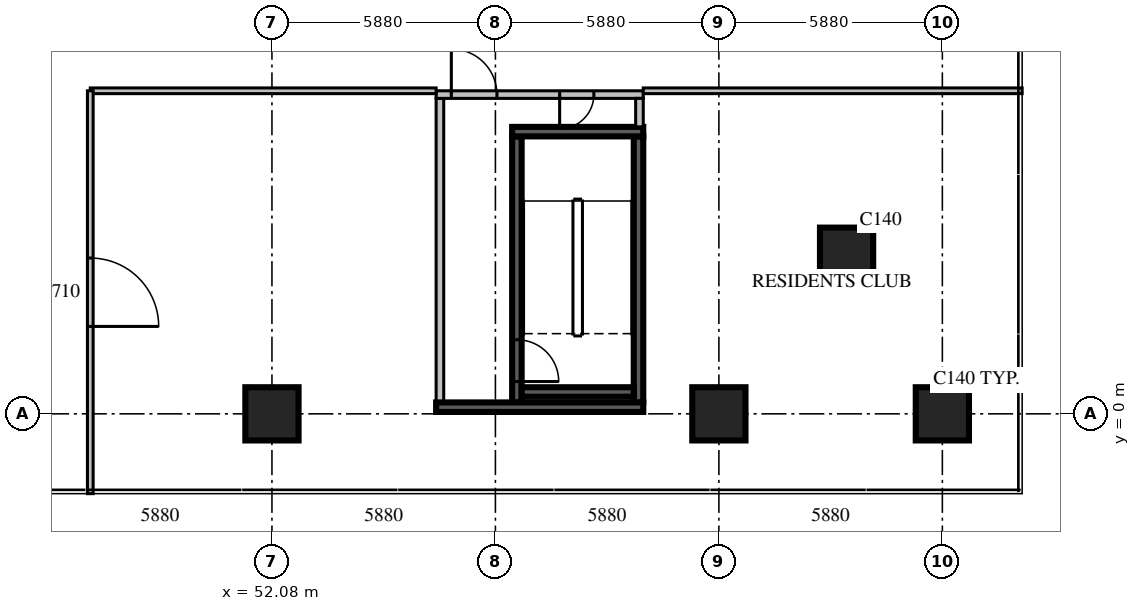
"""IFC4 building model, lengths in metres.
Left out: names, types, materials, properties, quantities, classifications, styles, units other than length and angle.
Written with IfcOpenShell. Run it as: python <this file> out.ifc"""

import sys

from ifc_helpers import new_model, si_unit, direction, frame, frame_2d, origin, origin_2d, place, context, subcontext, project, spatial, rectangle, extrude, source, transform, mapped, element, fill, save


model = new_model("IFC4")
c1 = context("Model", 3, precision=1e-05, world=origin(), true_north=direction((0.0, 1.0)))
c2 = subcontext(c1, "Body", "Model", "MODEL_VIEW")
j1 = project(units=[si_unit("LENGTHUNIT", "METRE"), si_unit("PLANEANGLEUNIT", "RADIAN")], contexts=[c1])
p1 = place(None, origin())
s1 = spatial("IfcSite", under=j1, at=p1, CompositionType="ELEMENT")
p2 = place(p1, origin())
s2 = spatial("IfcBuilding", under=s1, at=p2, CompositionType="ELEMENT")
p3 = place(p2, frame((0.0, 0.0, 23.7)))
s3 = spatial("IfcBuildingStorey", under=s2, at=p3, CompositionType="ELEMENT", Elevation=23.7)
m1 = source(origin(), c2, "Body", "SweptSolid", [
    extrude(rectangle(XDim=1.4, YDim=1.4, at=origin_2d()), origin(), (0.0, 0.0, 1.0), 5.4),
])
for number, where, z_axis, x_axis in (
    (1, (52.08, 0.0, 0.0), (0.0, 0.0, 1.0), (1.0, 0.0, 0.0)),
    (2, (63.84, 0.0, 0.0), (0.0, 0.0, 1.0), (1.0, 0.0, 0.0)),
    (3, (67.2, 4.2, 0.0), (0.0, 0.0, 1.0), (1.0, 0.0, 0.0)),
    (4, (69.72, 0.0, 0.0), (0.0, 0.0, 1.0), (1.0, 0.0, 0.0)),
):
    element("IfcColumn", number, at=place(p3, frame(where, z_axis=z_axis, x_axis=x_axis)), inside=s3, PredefinedType="COLUMN", context=c2, shape_type="MappedRepresentation", body=[
        mapped(m1, transform((0.0, 0.0, 0.0), scale=1.0)),
    ])
m2 = source(origin(), c2, "Body", "SweptSolid", [
    extrude(rectangle(XDim=7.0, YDim=0.25, at=frame_2d((3.5, 0.0))), origin(), (0.0, 0.0, 1.0), 4.8),
])
p4 = place(p3, frame((58.525, 0.3, 0.0), z_axis=(0.0, 0.0, 1.0), x_axis=(0.0, 1.0, 0.0)))
e5 = element("IfcWall", 5, at=p4, inside=s3, PredefinedType="SOLIDWALL", context=c2, shape_type="MappedRepresentation", body=[
    mapped(m2, transform((0.0, 0.0, 0.0), scale=1.0)),
])
m3 = source(origin(), c2, "Body", "SweptSolid", [
    extrude(rectangle(XDim=1.1, YDim=2.1, at=frame_2d((0.55, 1.05))), frame((0.0, 0.135, 0.0), z_axis=(0.0, -1.0, 0.0), x_axis=(1.0, 0.0, 0.0)), (0.0, 0.0, 1.0), 0.27),
])
p5 = place(p4, frame((0.55, 0.0, 0.0)))
e6 = element("IfcOpeningElement", 6, at=p5, cuts=e5, PredefinedType="OPENING", context=c2, shape_type="MappedRepresentation", body=[
    mapped(m3, transform((0.0, 0.0, 0.0), scale=1.0)),
])
p6 = place(p3, frame((61.725, 0.3, 0.0), z_axis=(0.0, 0.0, 1.0), x_axis=(0.0, 1.0, 0.0)))
e7 = element("IfcWall", 7, at=p6, inside=s3, PredefinedType="SOLIDWALL", context=c2, shape_type="MappedRepresentation", body=[
    mapped(m2, transform((0.0, 0.0, 0.0), scale=1.0)),
])
m4 = source(origin(), c2, "Body", "SweptSolid", [
    extrude(rectangle(XDim=3.45, YDim=0.25, at=frame_2d((1.725, 0.0))), origin(), (0.0, 0.0, 1.0), 4.8),
])
p7 = place(p3, frame((58.4, 7.425, 0.0), z_axis=(0.0, 0.0, 1.0), x_axis=(1.0, 0.0, 0.0)))
e8 = element("IfcWall", 8, at=p7, inside=s3, PredefinedType="SOLIDWALL", context=c2, shape_type="MappedRepresentation", body=[
    mapped(m4, transform((0.0, 0.0, 0.0), scale=1.0)),
])
m5 = source(origin(), c2, "Body", "SweptSolid", [
    extrude(rectangle(XDim=2.95, YDim=0.25, at=frame_2d((1.475, 0.0))), origin(), (0.0, 0.0, 1.0), 4.8),
])
p8 = place(p3, frame((58.65, 0.575, 0.0), z_axis=(0.0, 0.0, 1.0), x_axis=(1.0, 0.0, 0.0)))
e9 = element("IfcWall", 9, at=p8, inside=s3, PredefinedType="SOLIDWALL", context=c2, shape_type="MappedRepresentation", body=[
    mapped(m5, transform((0.0, 0.0, 0.0), scale=1.0)),
])
m6 = source(origin(), c2, "Body", "SweptSolid", [
    extrude(rectangle(XDim=8.0, YDim=0.2, at=frame_2d((4.0, 0.0))), origin(), (0.0, 0.0, 1.0), 4.8),
])
p9 = place(p3, frame((56.5, 0.3, 0.0), z_axis=(0.0, 0.0, 1.0), x_axis=(0.0, 1.0, 0.0)))
e10 = element("IfcWall", 10, at=p9, inside=s3, PredefinedType="PARTITIONING", context=c2, shape_type="MappedRepresentation", body=[
    mapped(m6, transform((0.0, 0.0, 0.0), scale=1.0)),
])
m7 = source(origin(), c2, "Body", "SweptSolid", [
    extrude(rectangle(XDim=5.45, YDim=0.2, at=frame_2d((2.725, 0.0))), origin(), (0.0, 0.0, 1.0), 4.8),
])
p10 = place(p3, frame((56.4, 8.4, 0.0), z_axis=(0.0, 0.0, 1.0), x_axis=(1.0, 0.0, 0.0)))
e11 = element("IfcWall", 11, at=p10, inside=s3, PredefinedType="PARTITIONING", context=c2, shape_type="MappedRepresentation", body=[
    mapped(m7, transform((0.0, 0.0, 0.0), scale=1.0)),
])
m8 = source(origin(), c2, "Body", "SweptSolid", [
    extrude(rectangle(XDim=1.2, YDim=2.1, at=frame_2d((0.6, 1.05))), frame((0.0, 0.11, 0.0), z_axis=(0.0, -1.0, 0.0), x_axis=(1.0, 0.0, 0.0)), (0.0, 0.0, 1.0), 0.22),
])
p11 = place(p10, frame((0.4, 0.0, 0.0)))
e12 = element("IfcOpeningElement", 12, at=p11, cuts=e11, PredefinedType="OPENING", context=c2, shape_type="MappedRepresentation", body=[
    mapped(m8, transform((0.0, 0.0, 0.0), scale=1.0)),
])
m9 = source(origin(), c2, "Body", "SweptSolid", [
    extrude(rectangle(XDim=0.9, YDim=2.1, at=frame_2d((0.45, 1.05))), frame((0.0, 0.11, 0.0), z_axis=(0.0, -1.0, 0.0), x_axis=(1.0, 0.0, 0.0)), (0.0, 0.0, 1.0), 0.22),
])
p12 = place(p10, frame((3.25, 0.0, 0.0)))
e13 = element("IfcOpeningElement", 13, at=p12, cuts=e11, PredefinedType="OPENING", context=c2, shape_type="MappedRepresentation", body=[
    mapped(m9, transform((0.0, 0.0, 0.0), scale=1.0)),
])
m10 = source(origin(), c2, "Body", "SweptSolid", [
    extrude(rectangle(XDim=0.75, YDim=0.2, at=frame_2d((0.375, 0.0))), origin(), (0.0, 0.0, 1.0), 4.8),
])
p13 = place(p3, frame((61.75, 7.55, 0.0), z_axis=(0.0, 0.0, 1.0), x_axis=(0.0, 1.0, 0.0)))
e14 = element("IfcWall", 14, at=p13, inside=s3, PredefinedType="PARTITIONING", context=c2, shape_type="MappedRepresentation", body=[
    mapped(m10, transform((0.0, 0.0, 0.0), scale=1.0)),
])
m11 = source(origin(), c2, "Body", "SweptSolid", [
    extrude(rectangle(XDim=5.45, YDim=0.25, at=frame_2d((2.725, 0.0))), origin(), (0.0, 0.0, 1.0), 4.8),
])
p14 = place(p3, frame((56.4, 0.175, 0.0), z_axis=(0.0, 0.0, 1.0), x_axis=(1.0, 0.0, 0.0)))
e15 = element("IfcWall", 15, at=p14, inside=s3, PredefinedType="SOLIDWALL", context=c2, shape_type="MappedRepresentation", body=[
    mapped(m11, transform((0.0, 0.0, 0.0), scale=1.0)),
])
m12 = source(origin(), c2, "Body", "SweptSolid", [
    extrude(rectangle(XDim=9.1, YDim=0.15, at=frame_2d((4.55, 0.0))), origin(), (0.0, 0.0, 1.0), 4.8),
])
p15 = place(p3, frame((47.3, 8.5, 0.0), z_axis=(0.0, 0.0, 1.0), x_axis=(1.0, 0.0, 0.0)))
e16 = element("IfcWall", 16, at=p15, inside=s3, PredefinedType="PARTITIONING", context=c2, shape_type="MappedRepresentation", body=[
    mapped(m12, transform((0.0, 0.0, 0.0), scale=1.0)),
])
m13 = source(origin(), c2, "Body", "SweptSolid", [
    extrude(rectangle(XDim=9.97, YDim=0.15, at=frame_2d((4.985, 0.0))), origin(), (0.0, 0.0, 1.0), 4.8),
])
p16 = place(p3, frame((61.85, 8.5, 0.0), z_axis=(0.0, 0.0, 1.0), x_axis=(1.0, 0.0, 0.0)))
e17 = element("IfcWall", 17, at=p16, inside=s3, PredefinedType="PARTITIONING", context=c2, shape_type="MappedRepresentation", body=[
    mapped(m13, transform((0.0, 0.0, 0.0), scale=1.0)),
])
m14 = source(origin(), c2, "Body", "SweptSolid", [
    extrude(rectangle(XDim=10.6, YDim=0.15, at=frame_2d((5.3, 0.0))), origin(), (0.0, 0.0, 1.0), 4.8),
])
p17 = place(p3, frame((47.3, -2.1, 0.0), z_axis=(0.0, 0.0, 1.0), x_axis=(0.0, 1.0, 0.0)))
e18 = element("IfcWall", 18, at=p17, inside=s3, PredefinedType="PARTITIONING", context=c2, shape_type="MappedRepresentation", body=[
    mapped(m14, transform((0.0, 0.0, 0.0), scale=1.0)),
])
m15 = source(origin(), c2, "Body", "SweptSolid", [
    extrude(rectangle(XDim=1.8, YDim=2.1, at=frame_2d((0.9, 1.05))), frame((0.0, 0.085, 0.0), z_axis=(0.0, -1.0, 0.0), x_axis=(1.0, 0.0, 0.0)), (0.0, 0.0, 1.0), 0.17),
])
p18 = place(p17, frame((4.4, 0.0, 0.0)))
e19 = element("IfcOpeningElement", 19, at=p18, cuts=e18, PredefinedType="OPENING", context=c2, shape_type="MappedRepresentation", body=[
    mapped(m15, transform((0.0, 0.0, 0.0), scale=1.0)),
])
m16 = source(origin(), c2, "Body", "SweptSolid", [
    extrude(rectangle(XDim=1.1, YDim=2.1, at=frame_2d((0.55, 1.05))), frame((0.0, 0.025, 0.0), z_axis=(0.0, -1.0, 0.0), x_axis=(1.0, 0.0, 0.0)), (0.0, 0.0, 1.0), 0.05),
])
p19 = place(p5, origin())
e20 = element("IfcDoor", 20, at=p19, inside=s3, OperationType="SINGLE_SWING_RIGHT", PredefinedType="DOOR", context=c2, shape_type="MappedRepresentation", body=[
    mapped(m16, transform((0.0, 0.0, 0.0), scale=1.0)),
])
fill(e6, e20)
m17 = source(origin(), c2, "Body", "SweptSolid", [
    extrude(rectangle(XDim=1.2, YDim=2.1, at=frame_2d((0.6, 1.05))), frame((0.0, 0.025, 0.0), z_axis=(0.0, -1.0, 0.0), x_axis=(1.0, 0.0, 0.0)), (0.0, 0.0, 1.0), 0.05),
])
p20 = place(p11, origin())
e21 = element("IfcDoor", 21, at=p20, inside=s3, OperationType="SINGLE_SWING_LEFT", PredefinedType="DOOR", context=c2, shape_type="MappedRepresentation", body=[
    mapped(m17, transform((0.0, 0.0, 0.0), scale=1.0)),
])
fill(e12, e21)
m18 = source(origin(), c2, "Body", "SweptSolid", [
    extrude(rectangle(XDim=0.9, YDim=2.1, at=frame_2d((0.45, 1.05))), frame((0.0, 0.025, 0.0), z_axis=(0.0, -1.0, 0.0), x_axis=(1.0, 0.0, 0.0)), (0.0, 0.0, 1.0), 0.05),
])
p21 = place(p12, origin())
e22 = element("IfcDoor", 22, at=p21, inside=s3, OperationType="SINGLE_SWING_RIGHT", PredefinedType="DOOR", context=c2, shape_type="MappedRepresentation", body=[
    mapped(m18, transform((0.0, 0.0, 0.0), scale=1.0)),
])
fill(e13, e22)
m19 = source(origin(), c2, "Body", "SweptSolid", [
    extrude(rectangle(XDim=1.8, YDim=2.1, at=frame_2d((0.9, 1.05))), frame((0.0, 0.025, 0.0), z_axis=(0.0, -1.0, 0.0), x_axis=(1.0, 0.0, 0.0)), (0.0, 0.0, 1.0), 0.05),
])
p22 = place(p18, origin())
e23 = element("IfcDoor", 23, at=p22, inside=s3, OperationType="DOUBLE_DOOR_SINGLE_SWING", PredefinedType="DOOR", context=c2, shape_type="MappedRepresentation", body=[
    mapped(m19, transform((0.0, 0.0, 0.0), scale=1.0)),
])
fill(e19, e23)
save(model, sys.argv[1])
